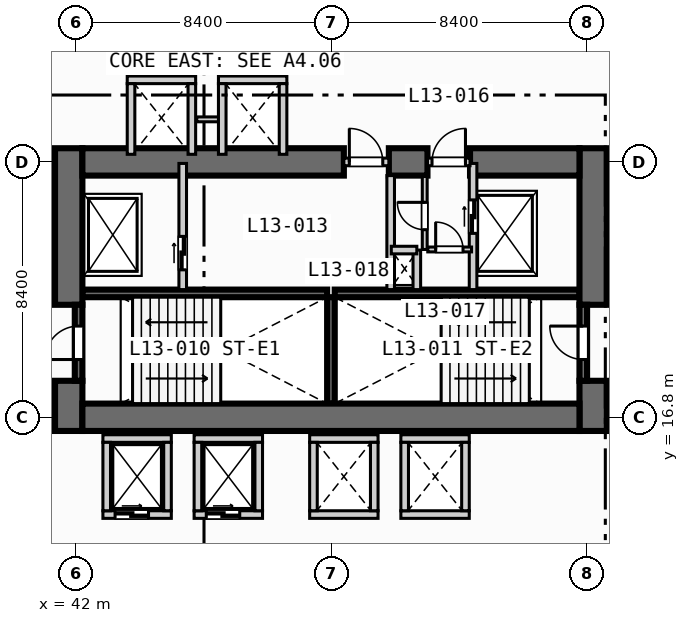
"""IFC4 building model, lengths in metres.
Left out: names, types, materials, properties, quantities, classifications, styles, units other than length and angle.
Written with IfcOpenShell. Run it as: python <this file> out.ifc"""

import sys

from ifc_helpers import new_model, si_unit, direction, frame, frame_2d, origin, place, context, subcontext, project, spatial, rectangle, extrude, element, fill, save


model = new_model("IFC4")
c1 = context("Model", 3, precision=1e-05, world=origin(), true_north=direction((0.0, 1.0)))
c2 = subcontext(c1, "Body", "Model", "MODEL_VIEW")
j1 = project(units=[si_unit("LENGTHUNIT", "METRE"), si_unit("PLANEANGLEUNIT", "RADIAN")], contexts=[c1])
p1 = place(None, origin())
s1 = spatial("IfcSite", under=j1, at=p1, CompositionType="ELEMENT")
p2 = place(p1, origin())
s2 = spatial("IfcBuilding", under=s1, at=p2, CompositionType="ELEMENT")
p3 = place(p2, frame((0.0, 0.0, 58.6)))
s3 = spatial("IfcBuildingStorey", under=s2, at=p3, CompositionType="ELEMENT", Elevation=58.6)
for number, where, z_axis, x_axis in (
    (1, (42.2, 20.875, 0.0), (0.0, 0.0, 1.0), (1.0, 0.0, 0.0)),
    (2, (50.5, 20.875, 0.0), (0.0, 0.0, 1.0), (1.0, 0.0, 0.0)),
):
    element("IfcWall", number, at=place(p3, frame(where, z_axis=z_axis, x_axis=x_axis)), inside=s3, PredefinedType="SOLIDWALL", context=c2, shape_type="SweptSolid", body=[
        extrude(rectangle(XDim=8.05, YDim=0.25, at=frame_2d((4.025, 0.0))), origin(), (0.0, 0.0, 1.0), 3.55),
    ])
p4 = place(p3, frame((50.375, 17.25, 0.0), z_axis=(0.0, 0.0, 1.0), x_axis=(0.0, 1.0, 0.0)))
e3 = element("IfcWall", 3, at=p4, inside=s3, PredefinedType="SOLIDWALL", context=c2, shape_type="SweptSolid", body=[
    extrude(rectangle(XDim=3.5, YDim=0.25, at=frame_2d((1.75, 0.0))), origin(), (0.0, 0.0, 1.0), 3.55),
])
p5 = place(p3, frame((41.75, 16.35, 0.0), z_axis=(0.0, 0.0, 1.0), x_axis=(0.0, 1.0, 0.0)))
e4 = element("IfcWall", 4, at=p5, inside=s3, PredefinedType="SHEAR", context=c2, shape_type="SweptSolid", body=[
    extrude(rectangle(XDim=1.65, YDim=0.9, at=frame_2d((0.825, 0.0))), origin(), (0.0, 0.0, 1.0), 3.55),
])
p6 = place(p3, frame((41.75, 20.5, 0.0), z_axis=(0.0, 0.0, 1.0), x_axis=(0.0, 1.0, 0.0)))
e5 = element("IfcWall", 5, at=p6, inside=s3, PredefinedType="SHEAR", context=c2, shape_type="SweptSolid", body=[
    extrude(rectangle(XDim=5.15, YDim=0.9, at=frame_2d((2.575, 0.0))), origin(), (0.0, 0.0, 1.0), 3.55),
])
p7 = place(p3, frame((59.0, 16.35, 0.0), z_axis=(0.0, 0.0, 1.0), x_axis=(0.0, 1.0, 0.0)))
e6 = element("IfcWall", 6, at=p7, inside=s3, PredefinedType="SHEAR", context=c2, shape_type="SweptSolid", body=[
    extrude(rectangle(XDim=1.65, YDim=0.9, at=frame_2d((0.825, 0.0))), origin(), (0.0, 0.0, 1.0), 3.55),
])
p8 = place(p3, frame((59.0, 20.5, 0.0), z_axis=(0.0, 0.0, 1.0), x_axis=(0.0, 1.0, 0.0)))
e7 = element("IfcWall", 7, at=p8, inside=s3, PredefinedType="SHEAR", context=c2, shape_type="SweptSolid", body=[
    extrude(rectangle(XDim=5.15, YDim=0.9, at=frame_2d((2.575, 0.0))), origin(), (0.0, 0.0, 1.0), 3.55),
])
p9 = place(p3, frame((42.2, 16.8, 0.0), z_axis=(0.0, 0.0, 1.0), x_axis=(1.0, 0.0, 0.0)))
e8 = element("IfcWall", 8, at=p9, inside=s3, PredefinedType="SHEAR", context=c2, shape_type="SweptSolid", body=[
    extrude(rectangle(XDim=16.35, YDim=0.9, at=frame_2d((8.175, 0.0))), origin(), (0.0, 0.0, 1.0), 3.55),
])
p10 = place(p3, frame((42.2, 25.2, 0.0), z_axis=(0.0, 0.0, 1.0), x_axis=(1.0, 0.0, 0.0)))
e9 = element("IfcWall", 9, at=p10, inside=s3, PredefinedType="SHEAR", context=c2, shape_type="SweptSolid", body=[
    extrude(rectangle(XDim=8.6, YDim=0.9, at=frame_2d((4.3, 0.0))), origin(), (0.0, 0.0, 1.0), 3.55),
])
p11 = place(p3, frame((52.28, 25.2, 0.0), z_axis=(0.0, 0.0, 1.0), x_axis=(1.0, 0.0, 0.0)))
e10 = element("IfcWall", 10, at=p11, inside=s3, PredefinedType="SHEAR", context=c2, shape_type="SweptSolid", body=[
    extrude(rectangle(XDim=1.27, YDim=0.9, at=frame_2d((0.635, 0.0))), origin(), (0.0, 0.0, 1.0), 3.55),
])
p12 = place(p3, frame((54.95, 25.2, 0.0), z_axis=(0.0, 0.0, 1.0), x_axis=(1.0, 0.0, 0.0)))
e11 = element("IfcWall", 11, at=p12, inside=s3, PredefinedType="SHEAR", context=c2, shape_type="SweptSolid", body=[
    extrude(rectangle(XDim=3.6, YDim=0.9, at=frame_2d((1.8, 0.0))), origin(), (0.0, 0.0, 1.0), 3.55),
])
p13 = place(p3, frame((42.075, 18.0, 0.0), z_axis=(0.0, 0.0, 1.0), x_axis=(0.0, 1.0, 0.0)))
e12 = element("IfcWall", 12, at=p13, inside=s3, PredefinedType="SOLIDWALL", context=c2, shape_type="SweptSolid", body=[
    extrude(rectangle(XDim=2.5, YDim=0.25, at=frame_2d((1.25, 0.0))), origin(), (0.0, 0.0, 1.0), 3.55),
])
p14 = place(p13, frame((0.7, 0.0, 0.0)))
e13 = element("IfcOpeningElement", 13, at=p14, cuts=e12, PredefinedType="OPENING", context=c2, shape_type="SweptSolid", body=[
    extrude(rectangle(XDim=1.1, YDim=2.15, at=frame_2d((0.55, 1.075))), frame((0.0, 0.135, 0.0), z_axis=(0.0, -1.0, 0.0), x_axis=(1.0, 0.0, 0.0)), (0.0, 0.0, 1.0), 0.27),
])
p15 = place(p3, frame((58.675, 18.0, 0.0), z_axis=(0.0, 0.0, 1.0), x_axis=(0.0, 1.0, 0.0)))
e14 = element("IfcWall", 14, at=p15, inside=s3, PredefinedType="SOLIDWALL", context=c2, shape_type="SweptSolid", body=[
    extrude(rectangle(XDim=2.5, YDim=0.25, at=frame_2d((1.25, 0.0))), origin(), (0.0, 0.0, 1.0), 3.55),
])
p16 = place(p15, frame((0.7, 0.0, 0.0)))
e15 = element("IfcOpeningElement", 15, at=p16, cuts=e14, PredefinedType="OPENING", context=c2, shape_type="SweptSolid", body=[
    extrude(rectangle(XDim=1.1, YDim=2.15, at=frame_2d((0.55, 1.075))), frame((0.0, 0.135, 0.0), z_axis=(0.0, -1.0, 0.0), x_axis=(1.0, 0.0, 0.0)), (0.0, 0.0, 1.0), 0.27),
])
p17 = place(p3, frame((45.5, 21.0, 0.0), z_axis=(0.0, 0.0, 1.0), x_axis=(0.0, 1.0, 0.0)))
e16 = element("IfcWall", 16, at=p17, inside=s3, PredefinedType="SOLIDWALL", context=c2, shape_type="SweptSolid", body=[
    extrude(rectangle(XDim=4.15, YDim=0.25, at=frame_2d((2.075, 0.0))), origin(), (0.0, 0.0, 1.0), 3.55),
])
p18 = place(p17, frame((0.65, 0.0, 0.0)))
e17 = element("IfcOpeningElement", 17, at=p18, cuts=e16, PredefinedType="OPENING", context=c2, shape_type="SweptSolid", body=[
    extrude(rectangle(XDim=1.1, YDim=2.15, at=frame_2d((0.55, 1.075))), frame((0.0, 0.135, 0.0), z_axis=(0.0, -1.0, 0.0), x_axis=(1.0, 0.0, 0.0)), (0.0, 0.0, 1.0), 0.27),
])
p19 = place(p3, frame((50.8, 25.2, 0.0), z_axis=(0.0, 0.0, 1.0), x_axis=(1.0, 0.0, 0.0)))
e18 = element("IfcWall", 18, at=p19, inside=s3, PredefinedType="SOLIDWALL", context=c2, shape_type="SweptSolid", body=[
    extrude(rectangle(XDim=1.48, YDim=0.25, at=frame_2d((0.74, 0.0))), origin(), (0.0, 0.0, 1.0), 3.55),
])
p20 = place(p19, frame((0.18, 0.0, 0.0)))
e19 = element("IfcOpeningElement", 19, at=p20, cuts=e18, PredefinedType="OPENING", context=c2, shape_type="SweptSolid", body=[
    extrude(rectangle(XDim=1.1, YDim=2.15, at=frame_2d((0.55, 1.075))), frame((0.0, 0.135, 0.0), z_axis=(0.0, -1.0, 0.0), x_axis=(1.0, 0.0, 0.0)), (0.0, 0.0, 1.0), 0.27),
])
p21 = place(p3, frame((52.34, 21.0, 0.0), z_axis=(0.0, 0.0, 1.0), x_axis=(0.0, 1.0, 0.0)))
e20 = element("IfcWall", 20, at=p21, inside=s3, PredefinedType="SOLIDWALL", context=c2, shape_type="SweptSolid", body=[
    extrude(rectangle(XDim=3.75, YDim=0.25, at=frame_2d((1.875, 0.0))), origin(), (0.0, 0.0, 1.0), 3.55),
])
p22 = place(p3, frame((55.05, 21.0, 0.0), z_axis=(0.0, 0.0, 1.0), x_axis=(0.0, 1.0, 0.0)))
e21 = element("IfcWall", 21, at=p22, inside=s3, PredefinedType="SOLIDWALL", context=c2, shape_type="SweptSolid", body=[
    extrude(rectangle(XDim=4.15, YDim=0.25, at=frame_2d((2.075, 0.0))), origin(), (0.0, 0.0, 1.0), 3.55),
])
p23 = place(p22, frame((1.85, 0.0, 0.0)))
e22 = element("IfcOpeningElement", 22, at=p23, cuts=e21, PredefinedType="OPENING", context=c2, shape_type="SweptSolid", body=[
    extrude(rectangle(XDim=1.1, YDim=2.15, at=frame_2d((0.55, 1.075))), frame((0.0, 0.135, 0.0), z_axis=(0.0, -1.0, 0.0), x_axis=(1.0, 0.0, 0.0)), (0.0, 0.0, 1.0), 0.27),
])
p24 = place(p3, frame((53.55, 25.2, 0.0), z_axis=(0.0, 0.0, 1.0), x_axis=(1.0, 0.0, 0.0)))
e23 = element("IfcWall", 23, at=p24, inside=s3, PredefinedType="SOLIDWALL", context=c2, shape_type="SweptSolid", body=[
    extrude(rectangle(XDim=1.4, YDim=0.25, at=frame_2d((0.7, 0.0))), origin(), (0.0, 0.0, 1.0), 3.55),
])
p25 = place(p24, frame((0.15, 0.0, 0.0)))
e24 = element("IfcOpeningElement", 24, at=p25, cuts=e23, PredefinedType="OPENING", context=c2, shape_type="SweptSolid", body=[
    extrude(rectangle(XDim=1.1, YDim=2.15, at=frame_2d((0.55, 1.075))), frame((0.0, 0.135, 0.0), z_axis=(0.0, -1.0, 0.0), x_axis=(1.0, 0.0, 0.0)), (0.0, 0.0, 1.0), 0.27),
])
p26 = place(p3, frame((53.2, 21.0, 0.0), z_axis=(0.0, 0.0, 1.0), x_axis=(0.0, 1.0, 0.0)))
e25 = element("IfcWall", 25, at=p26, inside=s3, PredefinedType="SOLIDWALL", context=c2, shape_type="SweptSolid", body=[
    extrude(rectangle(XDim=1.3, YDim=0.25, at=frame_2d((0.65, 0.0))), origin(), (0.0, 0.0, 1.0), 3.55),
])
p27 = place(p3, frame((52.36, 22.3, 0.0), z_axis=(0.0, 0.0, 1.0), x_axis=(1.0, 0.0, 0.0)))
e26 = element("IfcWall", 26, at=p27, inside=s3, PredefinedType="SOLIDWALL", context=c2, shape_type="SweptSolid", body=[
    extrude(rectangle(XDim=0.84, YDim=0.25, at=frame_2d((0.42, 0.0))), origin(), (0.0, 0.0, 1.0), 3.55),
])
p28 = place(p3, frame((53.56, 22.32, 0.0), z_axis=(0.0, 0.0, 1.0), x_axis=(1.0, 0.0, 0.0)))
e27 = element("IfcWall", 27, at=p28, inside=s3, PredefinedType="PARTITIONING", context=c2, shape_type="SweptSolid", body=[
    extrude(rectangle(XDim=1.44, YDim=0.16, at=frame_2d((0.72, 0.0))), origin(), (0.0, 0.0, 1.0), 3.55),
])
p29 = place(p28, frame((0.26, 0.0, 0.0)))
e28 = element("IfcOpeningElement", 28, at=p29, cuts=e27, PredefinedType="OPENING", context=c2, shape_type="SweptSolid", body=[
    extrude(rectangle(XDim=0.9, YDim=2.1, at=frame_2d((0.45, 1.05))), frame((0.0, 0.09, 0.0), z_axis=(0.0, -1.0, 0.0), x_axis=(1.0, 0.0, 0.0)), (0.0, 0.0, 1.0), 0.18),
])
p30 = place(p3, frame((53.46, 22.32, 0.0), z_axis=(0.0, 0.0, 1.0), x_axis=(0.0, 1.0, 0.0)))
e29 = element("IfcWall", 29, at=p30, inside=s3, PredefinedType="PARTITIONING", context=c2, shape_type="SweptSolid", body=[
    extrude(rectangle(XDim=2.4, YDim=0.16, at=frame_2d((1.2, 0.0))), origin(), (0.0, 0.0, 1.0), 3.55),
])
p31 = place(p30, frame((0.65, 0.0, 0.0)))
e30 = element("IfcOpeningElement", 30, at=p31, cuts=e29, PredefinedType="OPENING", context=c2, shape_type="SweptSolid", body=[
    extrude(rectangle(XDim=0.9, YDim=2.1, at=frame_2d((0.45, 1.05))), frame((0.0, 0.09, 0.0), z_axis=(0.0, -1.0, 0.0), x_axis=(1.0, 0.0, 0.0)), (0.0, 0.0, 1.0), 0.18),
])
p32 = place(p3, frame((42.875, 13.6, 0.0), z_axis=(0.0, 0.0, 1.0), x_axis=(1.0, 0.0, 0.0)))
e31 = element("IfcWall", 31, at=p32, inside=s3, PredefinedType="SOLIDWALL", context=c2, shape_type="SweptSolid", body=[
    extrude(rectangle(XDim=2.25, YDim=0.25, at=frame_2d((1.125, 0.0))), origin(), (0.0, 0.0, 1.0), 3.55),
])
p33 = place(p32, frame((0.4, 0.0, 0.0)))
e32 = element("IfcOpeningElement", 32, at=p33, cuts=e31, PredefinedType="OPENING", context=c2, shape_type="SweptSolid", body=[
    extrude(rectangle(XDim=1.1, YDim=2.15, at=frame_2d((0.55, 1.075))), frame((0.0, 0.135, 0.0), z_axis=(0.0, -1.0, 0.0), x_axis=(1.0, 0.0, 0.0)), (0.0, 0.0, 1.0), 0.27),
])
for number, where, z_axis, x_axis in (
    (33, (42.875, 16.1, 0.0), (0.0, 0.0, 1.0), (1.0, 0.0, 0.0)),
    (34, (43.0, 13.725, 0.0), (0.0, 0.0, 1.0), (0.0, 1.0, 0.0)),
    (35, (45.0, 13.725, 0.0), (0.0, 0.0, 1.0), (0.0, 1.0, 0.0)),
):
    element("IfcWall", number, at=place(p3, frame(where, z_axis=z_axis, x_axis=x_axis)), inside=s3, PredefinedType="SOLIDWALL", context=c2, shape_type="SweptSolid", body=[
        extrude(rectangle(XDim=2.25, YDim=0.25, at=frame_2d((1.125, 0.0))), origin(), (0.0, 0.0, 1.0), 3.55),
    ])
p34 = place(p3, frame((45.875, 13.6, 0.0), z_axis=(0.0, 0.0, 1.0), x_axis=(1.0, 0.0, 0.0)))
e36 = element("IfcWall", 36, at=p34, inside=s3, PredefinedType="SOLIDWALL", context=c2, shape_type="SweptSolid", body=[
    extrude(rectangle(XDim=2.25, YDim=0.25, at=frame_2d((1.125, 0.0))), origin(), (0.0, 0.0, 1.0), 3.55),
])
p35 = place(p34, frame((0.4, 0.0, 0.0)))
e37 = element("IfcOpeningElement", 37, at=p35, cuts=e36, PredefinedType="OPENING", context=c2, shape_type="SweptSolid", body=[
    extrude(rectangle(XDim=1.1, YDim=2.15, at=frame_2d((0.55, 1.075))), frame((0.0, 0.135, 0.0), z_axis=(0.0, -1.0, 0.0), x_axis=(1.0, 0.0, 0.0)), (0.0, 0.0, 1.0), 0.27),
])
for number, where, z_axis, x_axis in (
    (38, (45.875, 16.1, 0.0), (0.0, 0.0, 1.0), (1.0, 0.0, 0.0)),
    (39, (46.0, 13.725, 0.0), (0.0, 0.0, 1.0), (0.0, 1.0, 0.0)),
    (40, (48.0, 13.725, 0.0), (0.0, 0.0, 1.0), (0.0, 1.0, 0.0)),
    (41, (49.675, 13.6, 0.0), (0.0, 0.0, 1.0), (1.0, 0.0, 0.0)),
    (42, (49.675, 16.1, 0.0), (0.0, 0.0, 1.0), (1.0, 0.0, 0.0)),
    (43, (49.8, 13.725, 0.0), (0.0, 0.0, 1.0), (0.0, 1.0, 0.0)),
    (44, (51.8, 13.725, 0.0), (0.0, 0.0, 1.0), (0.0, 1.0, 0.0)),
    (45, (52.675, 13.6, 0.0), (0.0, 0.0, 1.0), (1.0, 0.0, 0.0)),
    (46, (52.675, 16.1, 0.0), (0.0, 0.0, 1.0), (1.0, 0.0, 0.0)),
    (47, (52.8, 13.725, 0.0), (0.0, 0.0, 1.0), (0.0, 1.0, 0.0)),
    (48, (54.8, 13.725, 0.0), (0.0, 0.0, 1.0), (0.0, 1.0, 0.0)),
    (49, (43.675, 27.9, 0.0), (0.0, 0.0, 1.0), (1.0, 0.0, 0.0)),
):
    element("IfcWall", number, at=place(p3, frame(where, z_axis=z_axis, x_axis=x_axis)), inside=s3, PredefinedType="SOLIDWALL", context=c2, shape_type="SweptSolid", body=[
        extrude(rectangle(XDim=2.25, YDim=0.25, at=frame_2d((1.125, 0.0))), origin(), (0.0, 0.0, 1.0), 3.55),
    ])
for number, where, z_axis, x_axis in (
    (50, (43.8, 25.45, 0.0), (0.0, 0.0, 1.0), (0.0, 1.0, 0.0)),
    (51, (45.8, 25.45, 0.0), (0.0, 0.0, 1.0), (0.0, 1.0, 0.0)),
):
    element("IfcWall", number, at=place(p3, frame(where, z_axis=z_axis, x_axis=x_axis)), inside=s3, PredefinedType="SOLIDWALL", context=c2, shape_type="SweptSolid", body=[
        extrude(rectangle(XDim=2.325, YDim=0.25, at=frame_2d((1.163, 0.0))), origin(), (0.0, 0.0, 1.0), 3.55),
    ])
p36 = place(p3, frame((45.96, 26.6, 0.0), z_axis=(0.0, 0.0, 1.0), x_axis=(1.0, 0.0, 0.0)))
e52 = element("IfcWall", 52, at=p36, inside=s3, PredefinedType="PARTITIONING", context=c2, shape_type="SweptSolid", body=[
    extrude(rectangle(XDim=0.88, YDim=0.16, at=frame_2d((0.44, 0.0))), origin(), (0.0, 0.0, 1.0), 3.55),
])
p37 = place(p3, frame((46.675, 27.9, 0.0), z_axis=(0.0, 0.0, 1.0), x_axis=(1.0, 0.0, 0.0)))
e53 = element("IfcWall", 53, at=p37, inside=s3, PredefinedType="SOLIDWALL", context=c2, shape_type="SweptSolid", body=[
    extrude(rectangle(XDim=2.25, YDim=0.25, at=frame_2d((1.125, 0.0))), origin(), (0.0, 0.0, 1.0), 3.55),
])
for number, where, z_axis, x_axis in (
    (54, (46.8, 25.45, 0.0), (0.0, 0.0, 1.0), (0.0, 1.0, 0.0)),
    (55, (48.8, 25.45, 0.0), (0.0, 0.0, 1.0), (0.0, 1.0, 0.0)),
):
    element("IfcWall", number, at=place(p3, frame(where, z_axis=z_axis, x_axis=x_axis)), inside=s3, PredefinedType="SOLIDWALL", context=c2, shape_type="SweptSolid", body=[
        extrude(rectangle(XDim=2.325, YDim=0.25, at=frame_2d((1.163, 0.0))), origin(), (0.0, 0.0, 1.0), 3.55),
    ])
p38 = place(p14, origin())
e56 = element("IfcDoor", 56, at=p38, inside=s3, OperationType="SINGLE_SWING_LEFT", PredefinedType="DOOR", context=c2, shape_type="SweptSolid", body=[
    extrude(rectangle(XDim=1.1, YDim=2.15, at=frame_2d((0.55, 1.075))), frame((0.0, 0.025, 0.0), z_axis=(0.0, -1.0, 0.0), x_axis=(1.0, 0.0, 0.0)), (0.0, 0.0, 1.0), 0.05),
])
fill(e13, e56)
p39 = place(p16, origin())
e57 = element("IfcDoor", 57, at=p39, inside=s3, OperationType="SINGLE_SWING_RIGHT", PredefinedType="DOOR", context=c2, shape_type="SweptSolid", body=[
    extrude(rectangle(XDim=1.1, YDim=2.15, at=frame_2d((0.55, 1.075))), frame((0.0, 0.025, 0.0), z_axis=(0.0, -1.0, 0.0), x_axis=(1.0, 0.0, 0.0)), (0.0, 0.0, 1.0), 0.05),
])
fill(e15, e57)
p40 = place(p18, origin())
e58 = element("IfcDoor", 58, at=p40, inside=s3, OperationType="SLIDING_TO_LEFT", PredefinedType="DOOR", context=c2, shape_type="SweptSolid", body=[
    extrude(rectangle(XDim=1.1, YDim=2.15, at=frame_2d((0.55, 1.075))), frame((0.0, 0.025, 0.0), z_axis=(0.0, -1.0, 0.0), x_axis=(1.0, 0.0, 0.0)), (0.0, 0.0, 1.0), 0.05),
])
fill(e17, e58)
p41 = place(p20, origin())
e59 = element("IfcDoor", 59, at=p41, inside=s3, OperationType="SINGLE_SWING_LEFT", PredefinedType="DOOR", context=c2, shape_type="SweptSolid", body=[
    extrude(rectangle(XDim=1.1, YDim=2.15, at=frame_2d((0.55, 1.075))), frame((0.0, 0.025, 0.0), z_axis=(0.0, -1.0, 0.0), x_axis=(1.0, 0.0, 0.0)), (0.0, 0.0, 1.0), 0.05),
])
fill(e19, e59)
p42 = place(p23, origin())
e60 = element("IfcDoor", 60, at=p42, inside=s3, OperationType="SLIDING_TO_LEFT", PredefinedType="DOOR", context=c2, shape_type="SweptSolid", body=[
    extrude(rectangle(XDim=1.1, YDim=2.15, at=frame_2d((0.55, 1.075))), frame((0.0, 0.025, 0.0), z_axis=(0.0, -1.0, 0.0), x_axis=(1.0, 0.0, 0.0)), (0.0, 0.0, 1.0), 0.05),
])
fill(e22, e60)
p43 = place(p25, origin())
e61 = element("IfcDoor", 61, at=p43, inside=s3, OperationType="SINGLE_SWING_RIGHT", PredefinedType="DOOR", context=c2, shape_type="SweptSolid", body=[
    extrude(rectangle(XDim=1.1, YDim=2.15, at=frame_2d((0.55, 1.075))), frame((0.0, 0.025, 0.0), z_axis=(0.0, -1.0, 0.0), x_axis=(1.0, 0.0, 0.0)), (0.0, 0.0, 1.0), 0.05),
])
fill(e24, e61)
p44 = place(p29, origin())
e62 = element("IfcDoor", 62, at=p44, inside=s3, OperationType="SINGLE_SWING_LEFT", PredefinedType="DOOR", context=c2, shape_type="SweptSolid", body=[
    extrude(rectangle(XDim=0.9, YDim=2.1, at=frame_2d((0.45, 1.05))), frame((0.0, 0.025, 0.0), z_axis=(0.0, -1.0, 0.0), x_axis=(1.0, 0.0, 0.0)), (0.0, 0.0, 1.0), 0.05),
])
fill(e28, e62)
p45 = place(p31, origin())
e63 = element("IfcDoor", 63, at=p45, inside=s3, OperationType="SINGLE_SWING_RIGHT", PredefinedType="DOOR", context=c2, shape_type="SweptSolid", body=[
    extrude(rectangle(XDim=0.9, YDim=2.1, at=frame_2d((0.45, 1.05))), frame((0.0, 0.025, 0.0), z_axis=(0.0, -1.0, 0.0), x_axis=(1.0, 0.0, 0.0)), (0.0, 0.0, 1.0), 0.05),
])
fill(e30, e63)
p46 = place(p33, origin())
e64 = element("IfcDoor", 64, at=p46, inside=s3, OperationType="SLIDING_TO_LEFT", PredefinedType="DOOR", context=c2, shape_type="SweptSolid", body=[
    extrude(rectangle(XDim=1.1, YDim=2.15, at=frame_2d((0.55, 1.075))), frame((0.0, 0.025, 0.0), z_axis=(0.0, -1.0, 0.0), x_axis=(1.0, 0.0, 0.0)), (0.0, 0.0, 1.0), 0.05),
])
fill(e32, e64)
p47 = place(p35, origin())
e65 = element("IfcDoor", 65, at=p47, inside=s3, OperationType="SLIDING_TO_LEFT", PredefinedType="DOOR", context=c2, shape_type="SweptSolid", body=[
    extrude(rectangle(XDim=1.1, YDim=2.15, at=frame_2d((0.55, 1.075))), frame((0.0, 0.025, 0.0), z_axis=(0.0, -1.0, 0.0), x_axis=(1.0, 0.0, 0.0)), (0.0, 0.0, 1.0), 0.05),
])
fill(e37, e65)
save(model, sys.argv[1])
